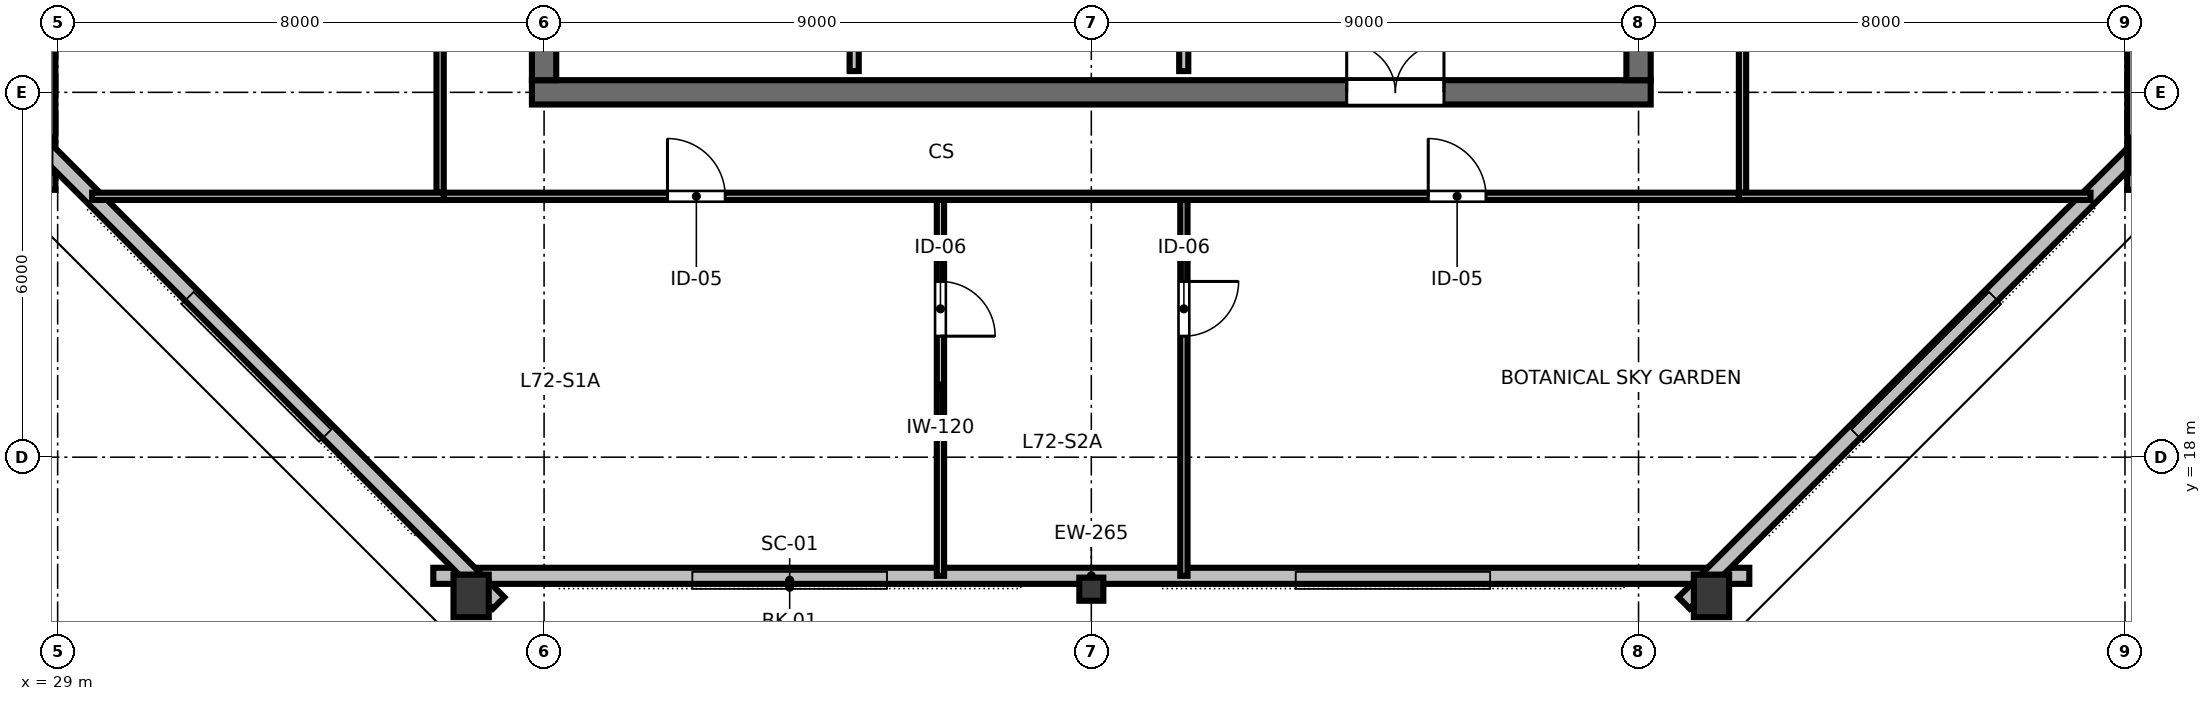
"""IFC4 building model, lengths in metres.
Left out: names, types, materials, properties, quantities, classifications, styles, units other than length and angle.
Written with IfcOpenShell. Run it as: python <this file> out.ifc"""

import sys

from ifc_helpers import new_model, si_unit, direction, frame, frame_2d, origin, origin_2d, place, context, subcontext, project, spatial, rectangle, hollow_rectangle, i_section, extrude, element, fill, save


model = new_model("IFC4")
c1 = context("Model", 3, precision=1e-05, world=origin(), true_north=direction((0.0, 1.0)))
c2 = subcontext(c1, "Body", "Model", "MODEL_VIEW")
j1 = project(units=[si_unit("LENGTHUNIT", "METRE"), si_unit("PLANEANGLEUNIT", "RADIAN")], contexts=[c1])
p1 = place(None, origin())
s1 = spatial("IfcSite", under=j1, at=p1, CompositionType="ELEMENT")
p2 = place(p1, origin())
s2 = spatial("IfcBuilding", under=s1, at=p2, CompositionType="ELEMENT")
p3 = place(p2, frame((0.0, 0.0, 271.8)))
s3 = spatial("IfcBuildingStorey", under=s2, at=p3, CompositionType="ELEMENT", Elevation=271.8)
p4 = place(p3, frame((36.8, 24.0, 0.0), z_axis=(0.0, 0.0, 1.0), x_axis=(1.0, 0.0, 0.0)))
e1 = element("IfcWall", 1, at=p4, inside=s3, PredefinedType="SHEAR", context=c2, shape_type="SweptSolid", body=[
    extrude(rectangle(XDim=18.4, YDim=0.4, at=frame_2d((9.2, 0.0))), origin(), (0.0, 0.0, 1.0), 3.36),
])
p5 = place(p4, frame((13.4, 0.0, 0.0)))
e2 = element("IfcOpeningElement", 2, at=p5, cuts=e1, PredefinedType="OPENING", context=c2, shape_type="SweptSolid", body=[
    extrude(rectangle(XDim=1.6, YDim=2.15, at=frame_2d((0.8, 1.075))), frame((0.0, 0.21, 0.0), z_axis=(0.0, -1.0, 0.0), x_axis=(1.0, 0.0, 0.0)), (0.0, 0.0, 1.0), 0.42),
])
p6 = place(p3, frame((37.0, 24.2, 0.0), z_axis=(0.0, 0.0, 1.0), x_axis=(0.0, 1.0, 0.0)))
e3 = element("IfcWall", 3, at=p6, inside=s3, PredefinedType="SHEAR", context=c2, shape_type="SweptSolid", body=[
    extrude(rectangle(XDim=15.6, YDim=0.4, at=frame_2d((7.8, 0.0))), origin(), (0.0, 0.0, 1.0), 3.36),
])
p7 = place(p6, frame((5.325, 0.0, 0.0)))
e4 = element("IfcOpeningElement", 4, at=p7, cuts=e3, PredefinedType="OPENING", context=c2, shape_type="SweptSolid", body=[
    extrude(rectangle(XDim=1.15, YDim=2.15, at=frame_2d((0.575, 1.075))), frame((0.0, 0.21, 0.0), z_axis=(0.0, -1.0, 0.0), x_axis=(1.0, 0.0, 0.0)), (0.0, 0.0, 1.0), 0.42),
])
p8 = place(p3, frame((55.0, 24.2, 0.0), z_axis=(0.0, 0.0, 1.0), x_axis=(0.0, 1.0, 0.0)))
e5 = element("IfcWall", 5, at=p8, inside=s3, PredefinedType="SHEAR", context=c2, shape_type="SweptSolid", body=[
    extrude(rectangle(XDim=15.6, YDim=0.4, at=frame_2d((7.8, 0.0))), origin(), (0.0, 0.0, 1.0), 3.36),
])
p9 = place(p8, frame((5.325, 0.0, 0.0)))
e6 = element("IfcOpeningElement", 6, at=p9, cuts=e5, PredefinedType="OPENING", context=c2, shape_type="SweptSolid", body=[
    extrude(rectangle(XDim=1.15, YDim=2.15, at=frame_2d((0.575, 1.075))), frame((0.0, 0.21, 0.0), z_axis=(0.0, -1.0, 0.0), x_axis=(1.0, 0.0, 0.0)), (0.0, 0.0, 1.0), 0.42),
])
p10 = place(p3, frame((35.8, 15.719, 0.0), z_axis=(0.0, 0.0, 1.0), x_axis=(1.0, 0.0, 0.0)))
e7 = element("IfcColumn", 7, at=p10, inside=s3, PredefinedType="COLUMN", context=c2, shape_type="SweptSolid", body=[
    extrude(hollow_rectangle(XDim=0.58, YDim=0.7, WallThickness=0.032, at=origin_2d()), origin(), (0.0, 0.0, 1.0), 3.373),
])
p11 = place(p3, frame((46.0, 15.829, 0.0), z_axis=(0.0, 0.0, 1.0), x_axis=(1.0, 0.0, 0.0)))
e8 = element("IfcColumn", 8, at=p11, inside=s3, PredefinedType="COLUMN", context=c2, shape_type="SweptSolid", body=[
    extrude(i_section(OverallWidth=0.395, OverallDepth=0.38, WebThickness=0.019, FlangeThickness=0.03, FilletRadius=0.025, at=origin_2d()), origin(), (0.0, 0.0, 1.0), 3.373),
])
p12 = place(p3, frame((56.2, 15.719, 0.0), z_axis=(0.0, 0.0, 1.0), x_axis=(1.0, 0.0, 0.0)))
e9 = element("IfcColumn", 9, at=p12, inside=s3, PredefinedType="COLUMN", context=c2, shape_type="SweptSolid", body=[
    extrude(hollow_rectangle(XDim=0.58, YDim=0.7, WallThickness=0.032, at=origin_2d()), origin(), (0.0, 0.0, 1.0), 3.373),
])
p13 = place(p3, frame((35.178, 16.049, 0.0), z_axis=(0.0, 0.0, 1.0), x_axis=(1.0, 0.0, 0.0)))
e10 = element("IfcWall", 10, at=p13, inside=s3, PredefinedType="STANDARD", context=c2, shape_type="SweptSolid", body=[
    extrude(rectangle(XDim=21.644, YDim=0.265, at=frame_2d((10.822, 0.0))), origin(), (0.0, 0.0, 1.0), 2.832),
])
p14 = place(p3, frame((55.747, 15.604, 0.0), z_axis=(0.0, 0.0, 1.0), x_axis=(0.707106781187, 0.707106781187, 0.0)))
e11 = element("IfcWall", 11, at=p14, inside=s3, PredefinedType="STANDARD", context=c2, shape_type="SweptSolid", body=[
    extrude(rectangle(XDim=11.125, YDim=0.265, at=frame_2d((5.562, 0.0))), origin(), (0.0, 0.0, 1.0), 2.832),
])
for number, where, z_axis, x_axis in (
    (12, (63.169, 22.396, 0.0), (0.0, 0.0, 1.0), (0.0, 1.0, 0.0)),
    (13, (28.831, 41.604, 0.0), (0.0, 0.0, 1.0), (0.0, -1.0, 0.0)),
):
    element("IfcWall", number, at=place(p3, frame(where, z_axis=z_axis, x_axis=x_axis)), inside=s3, PredefinedType="STANDARD", context=c2, shape_type="SweptSolid", body=[
        extrude(rectangle(XDim=19.207, YDim=0.265, at=frame_2d((9.604, 0.0))), origin(), (0.0, 0.0, 1.0), 2.832),
    ])
p15 = place(p3, frame((28.386, 23.471, 0.0), z_axis=(0.0, 0.0, 1.0), x_axis=(0.707106781187, -0.707106781187, 0.0)))
e14 = element("IfcWall", 14, at=p15, inside=s3, PredefinedType="STANDARD", context=c2, shape_type="SweptSolid", body=[
    extrude(rectangle(XDim=11.125, YDim=0.265, at=frame_2d((5.562, 0.0))), origin(), (0.0, 0.0, 1.0), 2.832),
])
p16 = place(p3, frame((42.1, 24.35, 0.0), z_axis=(0.0, 0.0, 1.0), x_axis=(0.0, 1.0, 0.0)))
e15 = element("IfcWall", 15, at=p16, inside=s3, PredefinedType="PARTITIONING", context=c2, shape_type="SweptSolid", body=[
    extrude(rectangle(XDim=3.9, YDim=0.15, at=frame_2d((1.95, 0.0))), origin(), (0.0, 0.0, 1.0), 3.375),
])
p17 = place(p16, frame((1.5, 0.0, 0.0)))
e16 = element("IfcOpeningElement", 16, at=p17, cuts=e15, PredefinedType="OPENING", context=c2, shape_type="SweptSolid", body=[
    extrude(rectangle(XDim=0.9, YDim=2.15, at=frame_2d((0.45, 1.075))), frame((0.0, 0.085, 0.0), z_axis=(0.0, -1.0, 0.0), x_axis=(1.0, 0.0, 0.0)), (0.0, 0.0, 1.0), 0.17),
])
p18 = place(p3, frame((47.52, 24.35, 0.0), z_axis=(0.0, 0.0, 1.0), x_axis=(0.0, 1.0, 0.0)))
e17 = element("IfcWall", 17, at=p18, inside=s3, PredefinedType="PARTITIONING", context=c2, shape_type="SweptSolid", body=[
    extrude(rectangle(XDim=3.9, YDim=0.15, at=frame_2d((1.95, 0.0))), origin(), (0.0, 0.0, 1.0), 3.375),
])
p19 = place(p18, frame((0.35, 0.0, 0.0)))
e18 = element("IfcOpeningElement", 18, at=p19, cuts=e17, PredefinedType="OPENING", context=c2, shape_type="SweptSolid", body=[
    extrude(rectangle(XDim=0.9, YDim=2.15, at=frame_2d((0.45, 1.075))), frame((0.0, 0.085, 0.0), z_axis=(0.0, -1.0, 0.0), x_axis=(1.0, 0.0, 0.0)), (0.0, 0.0, 1.0), 0.17),
])
p20 = place(p3, frame((43.519, 22.29, 0.0), z_axis=(0.0, 0.0, 1.0), x_axis=(0.0, -1.0, 0.0)))
e19 = element("IfcWall", 19, at=p20, inside=s3, PredefinedType="PARTITIONING", context=c2, shape_type="SweptSolid", body=[
    extrude(rectangle(XDim=6.241, YDim=0.12, at=frame_2d((3.121, 0.0))), origin(), (0.0, 0.0, 1.0), 2.655),
])
p21 = place(p20, frame((1.4, 0.0, 0.0)))
e20 = element("IfcOpeningElement", 20, at=p21, cuts=e19, PredefinedType="OPENING", context=c2, shape_type="SweptSolid", body=[
    extrude(rectangle(XDim=0.9, YDim=2.15, at=frame_2d((0.45, 1.075))), frame((0.0, 0.07, 0.0), z_axis=(0.0, -1.0, 0.0), x_axis=(1.0, 0.0, 0.0)), (0.0, 0.0, 1.0), 0.14),
])
p22 = place(p3, frame((47.523, 22.29, 0.0), z_axis=(0.0, 0.0, 1.0), x_axis=(0.0, -1.0, 0.0)))
e21 = element("IfcWall", 21, at=p22, inside=s3, PredefinedType="PARTITIONING", context=c2, shape_type="SweptSolid", body=[
    extrude(rectangle(XDim=6.241, YDim=0.12, at=frame_2d((3.121, 0.0))), origin(), (0.0, 0.0, 1.0), 2.655),
])
p23 = place(p22, frame((1.4, 0.0, 0.0)))
e22 = element("IfcOpeningElement", 22, at=p23, cuts=e21, PredefinedType="OPENING", context=c2, shape_type="SweptSolid", body=[
    extrude(rectangle(XDim=0.9, YDim=2.15, at=frame_2d((0.45, 1.075))), frame((0.0, 0.07, 0.0), z_axis=(0.0, -1.0, 0.0), x_axis=(1.0, 0.0, 0.0)), (0.0, 0.0, 1.0), 0.14),
])
p24 = place(p3, frame((35.35, 22.29, 0.0), z_axis=(0.0, 0.0, 1.0), x_axis=(1.0, 0.0, 0.0)))
e23 = element("IfcWall", 23, at=p24, inside=s3, PredefinedType="PARTITIONING", context=c2, shape_type="SweptSolid", body=[
    extrude(rectangle(XDim=21.3, YDim=0.12, at=frame_2d((10.65, 0.0))), origin(), (0.0, 0.0, 1.0), 2.655),
])
p25 = place(p24, frame((3.679, 0.0, 0.0)))
e24 = element("IfcOpeningElement", 24, at=p25, cuts=e23, PredefinedType="OPENING", context=c2, shape_type="SweptSolid", body=[
    extrude(rectangle(XDim=0.95, YDim=2.15, at=frame_2d((0.475, 1.075))), frame((0.0, 0.07, 0.0), z_axis=(0.0, -1.0, 0.0), x_axis=(1.0, 0.0, 0.0)), (0.0, 0.0, 1.0), 0.14),
])
p26 = place(p24, frame((16.191, 0.0, 0.0)))
e25 = element("IfcOpeningElement", 25, at=p26, cuts=e23, PredefinedType="OPENING", context=c2, shape_type="SweptSolid", body=[
    extrude(rectangle(XDim=0.95, YDim=2.15, at=frame_2d((0.475, 1.075))), frame((0.0, 0.07, 0.0), z_axis=(0.0, -1.0, 0.0), x_axis=(1.0, 0.0, 0.0)), (0.0, 0.0, 1.0), 0.14),
])
p27 = place(p3, frame((35.29, 22.35, 0.0), z_axis=(0.0, 0.0, 1.0), x_axis=(0.0, 1.0, 0.0)))
e26 = element("IfcWall", 26, at=p27, inside=s3, PredefinedType="PARTITIONING", context=c2, shape_type="SweptSolid", body=[
    extrude(rectangle(XDim=19.3, YDim=0.12, at=frame_2d((9.65, 0.0))), origin(), (0.0, 0.0, 1.0), 2.655),
])
p28 = place(p27, frame((4.201, 0.0, 0.0)))
e27 = element("IfcOpeningElement", 27, at=p28, cuts=e26, PredefinedType="OPENING", context=c2, shape_type="SweptSolid", body=[
    extrude(rectangle(XDim=0.95, YDim=2.15, at=frame_2d((0.475, 1.075))), frame((0.0, 0.07, 0.0), z_axis=(0.0, -1.0, 0.0), x_axis=(1.0, 0.0, 0.0)), (0.0, 0.0, 1.0), 0.14),
])
p29 = place(p27, frame((13.651, 0.0, 0.0)))
e28 = element("IfcOpeningElement", 28, at=p29, cuts=e26, PredefinedType="OPENING", context=c2, shape_type="SweptSolid", body=[
    extrude(rectangle(XDim=0.95, YDim=2.15, at=frame_2d((0.475, 1.075))), frame((0.0, 0.07, 0.0), z_axis=(0.0, -1.0, 0.0), x_axis=(1.0, 0.0, 0.0)), (0.0, 0.0, 1.0), 0.14),
])
p30 = place(p3, frame((56.71, 22.35, 0.0), z_axis=(0.0, 0.0, 1.0), x_axis=(0.0, 1.0, 0.0)))
e29 = element("IfcWall", 29, at=p30, inside=s3, PredefinedType="PARTITIONING", context=c2, shape_type="SweptSolid", body=[
    extrude(rectangle(XDim=19.3, YDim=0.12, at=frame_2d((9.65, 0.0))), origin(), (0.0, 0.0, 1.0), 2.655),
])
p31 = place(p30, frame((5.823, 0.0, 0.0)))
e30 = element("IfcOpeningElement", 30, at=p31, cuts=e29, PredefinedType="OPENING", context=c2, shape_type="SweptSolid", body=[
    extrude(rectangle(XDim=0.95, YDim=2.15, at=frame_2d((0.475, 1.075))), frame((0.0, 0.07, 0.0), z_axis=(0.0, -1.0, 0.0), x_axis=(1.0, 0.0, 0.0)), (0.0, 0.0, 1.0), 0.14),
])
p32 = place(p30, frame((15.272, 0.0, 0.0)))
e31 = element("IfcOpeningElement", 31, at=p32, cuts=e29, PredefinedType="OPENING", context=c2, shape_type="SweptSolid", body=[
    extrude(rectangle(XDim=0.95, YDim=2.15, at=frame_2d((0.475, 1.075))), frame((0.0, 0.07, 0.0), z_axis=(0.0, -1.0, 0.0), x_axis=(1.0, 0.0, 0.0)), (0.0, 0.0, 1.0), 0.14),
])
for number, where, z_axis, x_axis in (
    (32, (35.35, 22.29, 0.0), (0.0, 0.0, 1.0), (-1.0, 0.0, 0.0)),
    (33, (56.65, 22.29, 0.0), (0.0, 0.0, 1.0), (1.0, 0.0, 0.0)),
):
    element("IfcWall", number, at=place(p3, frame(where, z_axis=z_axis, x_axis=x_axis)), inside=s3, PredefinedType="PARTITIONING", context=c2, shape_type="SweptSolid", body=[
        extrude(rectangle(XDim=5.783, YDim=0.12, at=frame_2d((2.892, 0.0))), origin(), (0.0, 0.0, 1.0), 2.655),
    ])
p33 = place(p5, origin())
e34 = element("IfcDoor", 34, at=p33, inside=s3, OperationType="DOUBLE_DOOR_SINGLE_SWING", PredefinedType="DOOR", context=c2, shape_type="SweptSolid", body=[
    extrude(rectangle(XDim=1.6, YDim=2.15, at=frame_2d((0.8, 1.075))), frame((0.0, 0.025, 0.0), z_axis=(0.0, -1.0, 0.0), x_axis=(1.0, 0.0, 0.0)), (0.0, 0.0, 1.0), 0.05),
])
fill(e2, e34)
p34 = place(p21, origin())
e35 = element("IfcDoor", 35, at=p34, inside=s3, OperationType="SINGLE_SWING_RIGHT", PredefinedType="DOOR", context=c2, shape_type="SweptSolid", body=[
    extrude(rectangle(XDim=0.9, YDim=2.15, at=frame_2d((0.45, 1.075))), frame((0.0, 0.025, 0.0), z_axis=(0.0, -1.0, 0.0), x_axis=(1.0, 0.0, 0.0)), (0.0, 0.0, 1.0), 0.05),
])
fill(e20, e35)
p35 = place(p23, origin())
e36 = element("IfcDoor", 36, at=p35, inside=s3, OperationType="SINGLE_SWING_LEFT", PredefinedType="DOOR", context=c2, shape_type="SweptSolid", body=[
    extrude(rectangle(XDim=0.9, YDim=2.15, at=frame_2d((0.45, 1.075))), frame((0.0, 0.025, 0.0), z_axis=(0.0, -1.0, 0.0), x_axis=(1.0, 0.0, 0.0)), (0.0, 0.0, 1.0), 0.05),
])
fill(e22, e36)
p36 = place(p25, origin())
e37 = element("IfcDoor", 37, at=p36, inside=s3, OperationType="SINGLE_SWING_LEFT", PredefinedType="DOOR", context=c2, shape_type="SweptSolid", body=[
    extrude(rectangle(XDim=0.95, YDim=2.15, at=frame_2d((0.475, 1.075))), frame((0.0, 0.025, 0.0), z_axis=(0.0, -1.0, 0.0), x_axis=(1.0, 0.0, 0.0)), (0.0, 0.0, 1.0), 0.05),
])
fill(e24, e37)
p37 = place(p26, origin())
e38 = element("IfcDoor", 38, at=p37, inside=s3, OperationType="SINGLE_SWING_LEFT", PredefinedType="DOOR", context=c2, shape_type="SweptSolid", body=[
    extrude(rectangle(XDim=0.95, YDim=2.15, at=frame_2d((0.475, 1.075))), frame((0.0, 0.025, 0.0), z_axis=(0.0, -1.0, 0.0), x_axis=(1.0, 0.0, 0.0)), (0.0, 0.0, 1.0), 0.05),
])
fill(e25, e38)
save(model, sys.argv[1])
